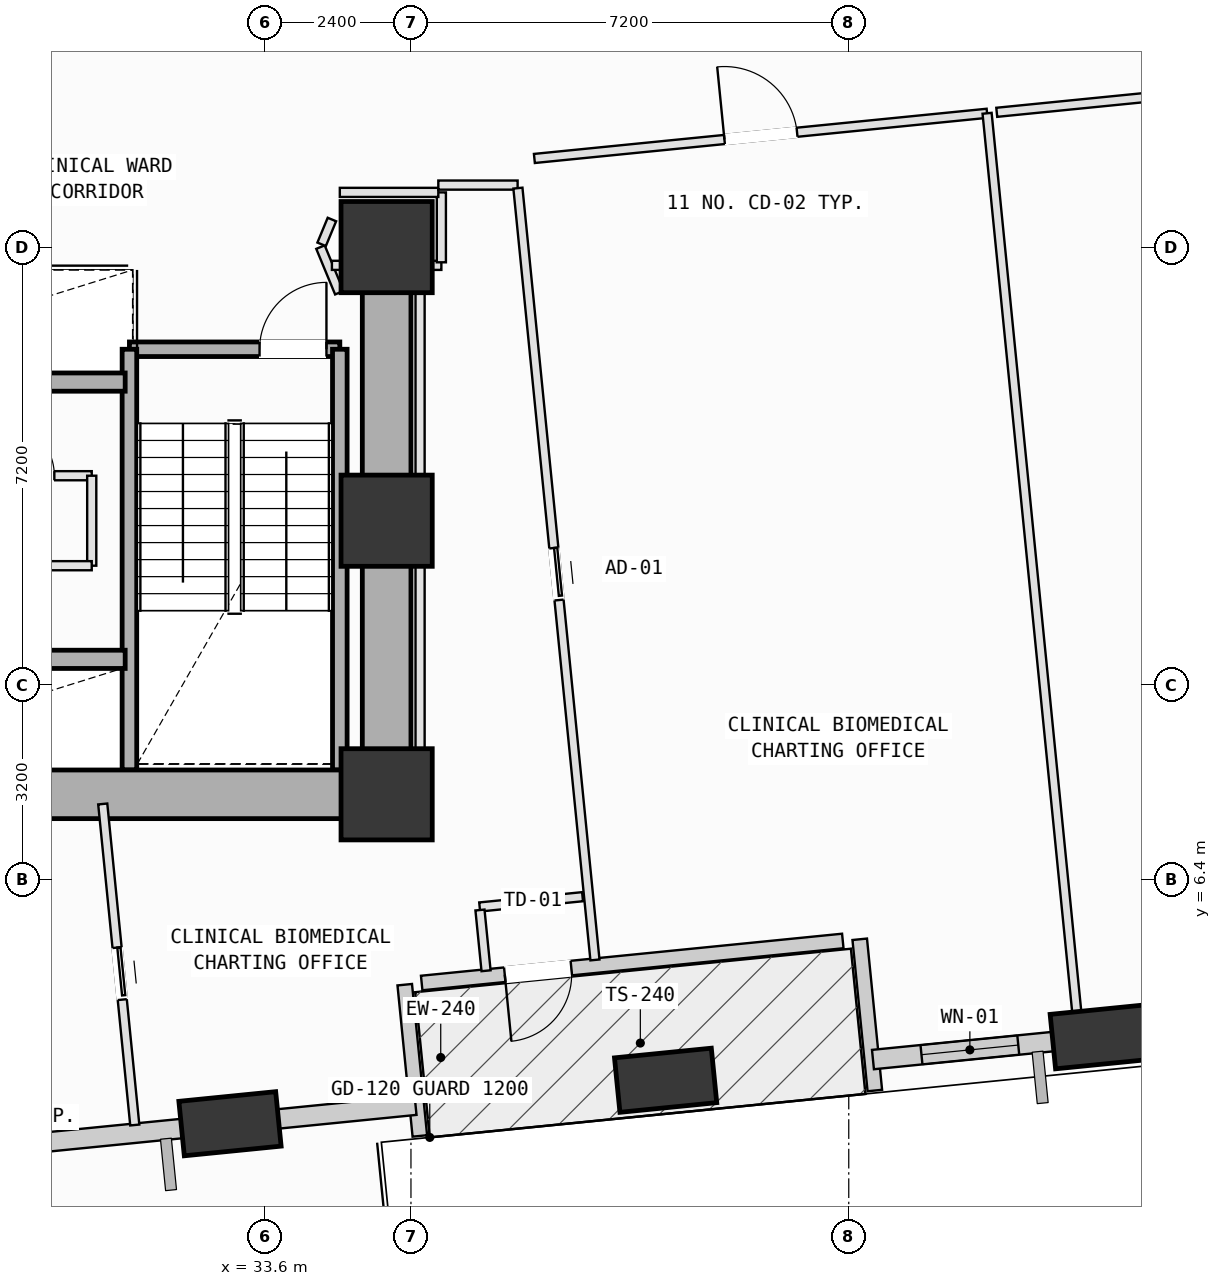
"""IFC4 building model, lengths in metres.
Left out: names, types, materials, properties, quantities, classifications, styles, units other than length and angle.
Written with IfcOpenShell. Run it as: python <this file> out.ifc"""

import sys

from ifc_helpers import new_model, si_unit, direction, frame, frame_2d, origin, origin_2d, place, context, subcontext, project, spatial, rectangle, extrude, element, fill, save


model = new_model("IFC4")
c1 = context("Model", 3, precision=1e-05, world=origin(), true_north=direction((0.0, 1.0)))
c2 = subcontext(c1, "Body", "Model", "MODEL_VIEW")
j1 = project(units=[si_unit("LENGTHUNIT", "METRE"), si_unit("PLANEANGLEUNIT", "RADIAN")], contexts=[c1])
p1 = place(None, origin())
s1 = spatial("IfcSite", under=j1, at=p1, CompositionType="ELEMENT")
p2 = place(p1, origin())
s2 = spatial("IfcBuilding", under=s1, at=p2, CompositionType="ELEMENT")
p3 = place(p2, frame((0.0, 0.0, 47.0)))
s3 = spatial("IfcBuildingStorey", under=s2, at=p3, CompositionType="ELEMENT", Elevation=47.0)
for number, where, z_axis, x_axis in (
    (1, (35.6, 7.8, 0.0), (0.0, 0.0, 1.0), (1.0, 0.0, 0.0)),
    (2, (35.6, 12.3, 0.0), (0.0, 0.0, 1.0), (1.0, 0.0, 0.0)),
    (3, (35.6, 16.8, 0.0), (0.0, 0.0, 1.0), (1.0, 0.0, 0.0)),
):
    element("IfcColumn", number, at=place(p3, frame(where, z_axis=z_axis, x_axis=x_axis)), inside=s3, PredefinedType="COLUMN", context=c2, shape_type="SweptSolid", body=[
        extrude(rectangle(XDim=1.5, YDim=1.5, at=origin_2d()), origin(), (0.0, 0.0, 1.0), 4.0),
    ])
p4 = place(p3, frame((33.024, 2.382, 0.002), z_axis=(0.092515267284, -0.00158145756, 0.995710010149), x_axis=(-0.081872211225, 0.996600464636, 0.009189935574)))
e4 = element("IfcColumn", 4, at=p4, inside=s3, PredefinedType="COLUMN", context=c2, shape_type="SweptSolid", body=[
    extrude(rectangle(XDim=1.6, YDim=0.9, at=origin_2d()), origin(), (0.0, 0.0, 1.0), 4.014),
])
p5 = place(p3, frame((40.188, 3.097, 0.002), z_axis=(0.089343341135, 0.027915992907, 0.995609594537), x_axis=(-0.391147030164, 0.920281246899, 0.00929663378)))
e5 = element("IfcColumn", 5, at=p5, inside=s3, PredefinedType="COLUMN", context=c2, shape_type="SweptSolid", body=[
    extrude(rectangle(XDim=1.6, YDim=0.9, at=origin_2d()), origin(), (0.0, 0.0, 1.0), 4.014),
])
p6 = place(p3, frame((47.353, 3.812, 0.002), z_axis=(0.086035721767, 0.057417907535, 0.994636133706), x_axis=(-0.634531084789, 0.772829064842, 0.010273216236)))
e6 = element("IfcColumn", 6, at=p6, inside=s3, PredefinedType="COLUMN", context=c2, shape_type="SweptSolid", body=[
    extrude(rectangle(XDim=1.6, YDim=0.9, at=origin_2d()), origin(), (0.0, 0.0, 1.0), 4.018),
])
p7 = place(p3, frame((43.102, 5.388, 0.0), z_axis=(0.0, 0.0, 1.0), x_axis=(-0.995056966999, -0.099305752232, 0.0)))
e7 = element("IfcWall", 7, at=p7, inside=s3, PredefinedType="SOLIDWALL", context=c2, shape_type="SweptSolid", body=[
    extrude(rectangle(XDim=6.96, YDim=0.24, at=frame_2d((3.48, 0.0))), origin(), (0.0, 0.0, 1.0), 3.165),
])
p8 = place(p7, frame((4.487, 0.0, 0.0)))
e8 = element("IfcOpeningElement", 8, at=p8, cuts=e7, PredefinedType="OPENING", context=c2, shape_type="SweptSolid", body=[
    extrude(rectangle(XDim=1.1, YDim=2.15, at=frame_2d((0.55, 1.075))), frame((0.0, 0.13, 0.0), z_axis=(0.0, -1.0, 0.0), x_axis=(1.0, 0.0, 0.0)), (0.0, 0.0, 1.0), 0.26),
])
p9 = place(p3, frame((35.898, 4.669, 0.0), z_axis=(0.0, 0.0, 1.0), x_axis=(0.099310350221, -0.995056508113, 0.0)))
e9 = element("IfcWall", 9, at=p9, inside=s3, PredefinedType="SOLIDWALL", context=c2, shape_type="SweptSolid", body=[
    extrude(rectangle(XDim=2.5, YDim=0.24, at=frame_2d((1.25, 0.0))), origin(), (0.0, 0.0, 1.0), 3.165),
])
p10 = place(p3, frame((43.629, 2.928, 0.0), z_axis=(0.0, 0.0, 1.0), x_axis=(-0.099320000899, 0.995055544893, 0.0)))
e10 = element("IfcWall", 10, at=p10, inside=s3, PredefinedType="SOLIDWALL", context=c2, shape_type="SweptSolid", body=[
    extrude(rectangle(XDim=2.5, YDim=0.24, at=frame_2d((1.25, 0.0))), origin(), (0.0, 0.0, 1.0), 3.165),
])
p11 = place(p3, frame((32.603, 2.34, 0.0), z_axis=(0.0, 0.0, 1.0), x_axis=(-0.995058153954, -0.099293858063, 0.0)))
e11 = element("IfcWall", 11, at=p11, inside=s3, PredefinedType="SOLIDWALL", context=c2, shape_type="SweptSolid", body=[
    extrude(rectangle(XDim=5.99, YDim=0.32, at=frame_2d((2.995, 0.0))), origin(), (0.0, 0.0, 1.0), 3.165),
])
p12 = place(p11, frame((2.767, 0.0, 0.75)))
e12 = element("IfcOpeningElement", 12, at=p12, cuts=e11, PredefinedType="OPENING", context=c2, shape_type="SweptSolid", body=[
    extrude(rectangle(XDim=1.8, YDim=2.05, at=frame_2d((0.9, 1.025))), frame((0.0, 0.17, 0.0), z_axis=(0.0, -1.0, 0.0), x_axis=(1.0, 0.0, 0.0)), (0.0, 0.0, 1.0), 0.34),
])
p13 = place(p3, frame((36.075, 2.687, 0.0), z_axis=(0.0, 0.0, 1.0), x_axis=(-0.995059481392, -0.099280554448, 0.0)))
e13 = element("IfcWall", 13, at=p13, inside=s3, PredefinedType="SOLIDWALL", context=c2, shape_type="SweptSolid", body=[
    extrude(rectangle(XDim=2.275, YDim=0.32, at=frame_2d((1.137, 0.0))), origin(), (0.0, 0.0, 1.0), 3.145),
])
p14 = place(p3, frame((46.938, 3.771, 0.0), z_axis=(0.0, 0.0, 1.0), x_axis=(-0.995059489142, -0.099280476769, 0.0)))
e14 = element("IfcWall", 14, at=p14, inside=s3, PredefinedType="SOLIDWALL", context=c2, shape_type="SweptSolid", body=[
    extrude(rectangle(XDim=3.357, YDim=0.32, at=frame_2d((1.678, 0.0))), origin(), (0.0, 0.0, 1.0), 3.145),
])
p15 = place(p14, frame((0.955, 0.0, 0.75)))
e15 = element("IfcOpeningElement", 15, at=p15, cuts=e14, PredefinedType="OPENING", context=c2, shape_type="SweptSolid", body=[
    extrude(rectangle(XDim=1.6, YDim=1.95, at=frame_2d((0.8, 0.975))), frame((0.0, 0.17, 0.0), z_axis=(0.0, -1.0, 0.0), x_axis=(1.0, 0.0, 0.0)), (0.0, 0.0, 1.0), 0.34),
])
p16 = place(p3, frame((31.37, 15.12, 0.0), z_axis=(0.0, 0.0, 1.0), x_axis=(1.0, 0.0, 0.0)))
e16 = element("IfcWall", 16, at=p16, inside=s3, PredefinedType="SOLIDWALL", context=c2, shape_type="SweptSolid", body=[
    extrude(rectangle(XDim=3.46, YDim=0.24, at=frame_2d((1.73, 0.0))), origin(), (0.0, 0.0, 1.0), 3.78),
])
p17 = place(p16, frame((2.14, 0.0, 0.0)))
e17 = element("IfcOpeningElement", 17, at=p17, cuts=e16, PredefinedType="OPENING", context=c2, shape_type="SweptSolid", body=[
    extrude(rectangle(XDim=1.1, YDim=2.15, at=frame_2d((0.55, 1.075))), frame((0.0, 0.13, 0.0), z_axis=(0.0, -1.0, 0.0), x_axis=(1.0, 0.0, 0.0)), (0.0, 0.0, 1.0), 0.26),
])
for number, where, z_axis, x_axis in (
    (18, (34.83, 15.12, 0.0), (0.0, 0.0, 1.0), (0.0, -1.0, 0.0)),
    (19, (31.37, 8.2, 0.0), (0.0, 0.0, 1.0), (0.0, 1.0, 0.0)),
):
    element("IfcWall", number, at=place(p3, frame(where, z_axis=z_axis, x_axis=x_axis)), inside=s3, PredefinedType="SOLIDWALL", context=c2, shape_type="SweptSolid", body=[
        extrude(rectangle(XDim=6.92, YDim=0.24, at=frame_2d((3.46, 0.0))), origin(), (0.0, 0.0, 1.0), 3.78),
    ])
p18 = place(p3, frame((24.8, 7.8, 0.0), z_axis=(0.0, 0.0, 1.0), x_axis=(1.0, 0.0, 0.0)))
e20 = element("IfcWall", 20, at=p18, inside=s3, PredefinedType="SHEAR", context=c2, shape_type="SweptSolid", body=[
    extrude(rectangle(XDim=10.8, YDim=0.8, at=frame_2d((5.4, 0.0))), origin(), (0.0, 0.0, 1.0), 3.78),
])
p19 = place(p3, frame((35.6, 7.8, 0.0), z_axis=(0.0, 0.0, 1.0), x_axis=(0.0, 1.0, 0.0)))
e21 = element("IfcWall", 21, at=p19, inside=s3, PredefinedType="SHEAR", context=c2, shape_type="SweptSolid", body=[
    extrude(rectangle(XDim=9.0, YDim=0.8, at=frame_2d((4.5, 0.0))), origin(), (0.0, 0.0, 1.0), 3.78),
])
p20 = place(p3, frame((25.85, 10.02, 0.0), z_axis=(0.0, 0.0, 1.0), x_axis=(1.0, 0.0, 0.0)))
e22 = element("IfcWall", 22, at=p20, inside=s3, PredefinedType="SOLIDWALL", context=c2, shape_type="SweptSolid", body=[
    extrude(rectangle(XDim=5.45, YDim=0.3, at=frame_2d((2.725, 0.0))), origin(), (0.0, 0.0, 1.0), 3.78),
])
p21 = place(p20, frame((0.34, 0.0, 0.0)))
e23 = element("IfcOpeningElement", 23, at=p21, cuts=e22, PredefinedType="OPENING", context=c2, shape_type="SweptSolid", body=[
    extrude(rectangle(XDim=1.12, YDim=2.15, at=frame_2d((0.56, 1.075))), frame((0.0, 0.16, 0.0), z_axis=(0.0, -1.0, 0.0), x_axis=(1.0, 0.0, 0.0)), (0.0, 0.0, 1.0), 0.32),
])
p22 = place(p20, frame((2.24, 0.0, 0.0)))
e24 = element("IfcOpeningElement", 24, at=p22, cuts=e22, PredefinedType="OPENING", context=c2, shape_type="SweptSolid", body=[
    extrude(rectangle(XDim=1.12, YDim=2.15, at=frame_2d((0.56, 1.075))), frame((0.0, 0.16, 0.0), z_axis=(0.0, -1.0, 0.0), x_axis=(1.0, 0.0, 0.0)), (0.0, 0.0, 1.0), 0.32),
])
p23 = place(p3, frame((25.85, 14.58, 0.0), z_axis=(0.0, 0.0, 1.0), x_axis=(1.0, 0.0, 0.0)))
e25 = element("IfcWall", 25, at=p23, inside=s3, PredefinedType="SOLIDWALL", context=c2, shape_type="SweptSolid", body=[
    extrude(rectangle(XDim=5.45, YDim=0.3, at=frame_2d((2.725, 0.0))), origin(), (0.0, 0.0, 1.0), 3.78),
])
p24 = place(p3, frame((28.6, 13.04, 0.0), z_axis=(0.0, 0.0, 1.0), x_axis=(1.0, 0.0, 0.0)))
e26 = element("IfcWall", 26, at=p24, inside=s3, PredefinedType="PARTITIONING", context=c2, shape_type="SweptSolid", body=[
    extrude(rectangle(XDim=2.15, YDim=0.15, at=frame_2d((1.075, 0.0))), origin(), (0.0, 0.0, 1.0), 3.78),
])
p25 = place(p24, frame((0.615, 0.0, 0.0)))
e27 = element("IfcOpeningElement", 27, at=p25, cuts=e26, PredefinedType="OPENING", context=c2, shape_type="SweptSolid", body=[
    extrude(rectangle(XDim=0.92, YDim=2.1, at=frame_2d((0.46, 1.05))), frame((0.0, 0.085, 0.0), z_axis=(0.0, -1.0, 0.0), x_axis=(1.0, 0.0, 0.0)), (0.0, 0.0, 1.0), 0.17),
])
p26 = place(p3, frame((30.75, 13.04, 0.0), z_axis=(0.0, 0.0, 1.0), x_axis=(0.0, -1.0, 0.0)))
e28 = element("IfcWall", 28, at=p26, inside=s3, PredefinedType="PARTITIONING", context=c2, shape_type="SweptSolid", body=[
    extrude(rectangle(XDim=1.48, YDim=0.15, at=frame_2d((0.74, 0.0))), origin(), (0.0, 0.0, 1.0), 3.78),
])
p27 = place(p3, frame((30.75, 11.56, 0.0), z_axis=(0.0, 0.0, 1.0), x_axis=(-1.0, 0.0, 0.0)))
e29 = element("IfcWall", 29, at=p27, inside=s3, PredefinedType="PARTITIONING", context=c2, shape_type="SweptSolid", body=[
    extrude(rectangle(XDim=2.15, YDim=0.15, at=frame_2d((1.075, 0.0))), origin(), (0.0, 0.0, 1.0), 3.78),
])
p28 = place(p3, frame((30.931, 7.641, 0.0), z_axis=(0.0, 0.0, 1.0), x_axis=(0.099335166826, -0.995054031011, 0.0)))
e30 = element("IfcWall", 30, at=p28, inside=s3, PredefinedType="PARTITIONING", context=c2, shape_type="SweptSolid", body=[
    extrude(rectangle(XDim=5.306, YDim=0.15, at=frame_2d((2.653, 0.0))), origin(), (0.0, 0.0, 1.0), 3.78),
])
p29 = place(p28, frame((2.374, 0.0, 0.0)))
e31 = element("IfcOpeningElement", 31, at=p29, cuts=e30, PredefinedType="OPENING", context=c2, shape_type="SweptSolid", body=[
    extrude(rectangle(XDim=0.86, YDim=2.06, at=frame_2d((0.43, 1.03))), frame((0.0, 0.085, 0.0), z_axis=(0.0, -1.0, 0.0), x_axis=(1.0, 0.0, 0.0)), (0.0, 0.0, 1.0), 0.17),
])
p30 = place(p3, frame((36.15, 7.5, 0.0), z_axis=(0.0, 0.0, 1.0), x_axis=(0.0, 1.0, 0.0)))
e32 = element("IfcWall", 32, at=p30, inside=s3, PredefinedType="PARTITIONING", context=c2, shape_type="SweptSolid", body=[
    extrude(rectangle(XDim=8.84, YDim=0.15, at=frame_2d((4.42, 0.0))), origin(), (0.0, 0.0, 1.0), 3.78),
])
p31 = place(p3, frame((34.822, 16.05, 0.0), z_axis=(0.0, 0.0, 1.0), x_axis=(-0.382050639738, 0.924141389981, 0.0)))
e33 = element("IfcWall", 33, at=p31, inside=s3, PredefinedType="PARTITIONING", context=c2, shape_type="SweptSolid", body=[
    extrude(rectangle(XDim=0.812, YDim=0.15, at=frame_2d((0.406, 0.0))), origin(), (0.0, 0.0, 1.0), 3.78),
])
p32 = place(p3, frame((34.531, 16.846, 0.0), z_axis=(0.0, 0.0, 1.0), x_axis=(0.382612233621, 0.923909020782, 0.0)))
e34 = element("IfcWall", 34, at=p32, inside=s3, PredefinedType="PARTITIONING", context=c2, shape_type="SweptSolid", body=[
    extrude(rectangle(XDim=0.442, YDim=0.15, at=frame_2d((0.221, 0.0))), origin(), (0.0, 0.0, 1.0), 3.78),
])
p33 = place(p3, frame((34.7, 16.5, 0.0), z_axis=(0.0, 0.0, 1.0), x_axis=(1.0, 0.0, 0.0)))
e35 = element("IfcWall", 35, at=p33, inside=s3, PredefinedType="PARTITIONING", context=c2, shape_type="SweptSolid", body=[
    extrude(rectangle(XDim=0.525, YDim=0.15, at=frame_2d((0.263, 0.0))), origin(), (0.0, 0.0, 1.0), 2.865),
])
p34 = place(p3, frame((35.975, 16.5, 0.0), z_axis=(0.0, 0.0, 1.0), x_axis=(1.0, 0.0, 0.0)))
e36 = element("IfcWall", 36, at=p34, inside=s3, PredefinedType="PARTITIONING", context=c2, shape_type="SweptSolid", body=[
    extrude(rectangle(XDim=0.525, YDim=0.15, at=frame_2d((0.262, 0.0))), origin(), (0.0, 0.0, 1.0), 3.78),
])
p35 = place(p3, frame((36.5, 16.55, 0.0), z_axis=(0.0, 0.0, 1.0), x_axis=(0.0, 1.0, 0.0)))
e37 = element("IfcWall", 37, at=p35, inside=s3, PredefinedType="PARTITIONING", context=c2, shape_type="SweptSolid", body=[
    extrude(rectangle(XDim=1.15, YDim=0.15, at=frame_2d((0.575, 0.0))), origin(), (0.0, 0.0, 1.0), 3.78),
])
p36 = place(p3, frame((36.45, 17.7, 0.0), z_axis=(0.0, 0.0, 1.0), x_axis=(-1.0, 0.0, 0.0)))
e38 = element("IfcWall", 38, at=p36, inside=s3, PredefinedType="PARTITIONING", context=c2, shape_type="SweptSolid", body=[
    extrude(rectangle(XDim=1.62, YDim=0.15, at=frame_2d((0.81, 0.0))), origin(), (0.0, 0.0, 1.0), 3.78),
])
p37 = place(p3, frame((36.45, 17.82, 0.0), z_axis=(0.0, 0.0, 1.0), x_axis=(1.0, 0.0, 0.0)))
e39 = element("IfcWall", 39, at=p37, inside=s3, PredefinedType="PARTITIONING", context=c2, shape_type="SweptSolid", body=[
    extrude(rectangle(XDim=1.304, YDim=0.15, at=frame_2d((0.652, 0.0))), origin(), (0.0, 0.0, 1.0), 3.78),
])
p38 = place(p3, frame((37.759, 17.77, 0.0), z_axis=(0.0, 0.0, 1.0), x_axis=(0.099304762274, -0.995057065796, 0.0)))
e40 = element("IfcWall", 40, at=p38, inside=s3, PredefinedType="PARTITIONING", context=c2, shape_type="SweptSolid", body=[
    extrude(rectangle(XDim=12.757, YDim=0.15, at=frame_2d((6.378, 0.0))), origin(), (0.0, 0.0, 1.0), 3.78),
])
p39 = place(p38, frame((5.948, 0.0, 0.0)))
e41 = element("IfcOpeningElement", 41, at=p39, cuts=e40, PredefinedType="OPENING", context=c2, shape_type="SweptSolid", body=[
    extrude(rectangle(XDim=0.86, YDim=2.06, at=frame_2d((0.43, 1.03))), frame((0.0, 0.085, 0.0), z_axis=(0.0, -1.0, 0.0), x_axis=(1.0, 0.0, 0.0)), (0.0, 0.0, 1.0), 0.17),
])
p40 = place(p3, frame((38.822, 6.116, 0.0), z_axis=(0.0, 0.0, 1.0), x_axis=(-0.995052813777, -0.099347359275, 0.0)))
e42 = element("IfcWall", 42, at=p40, inside=s3, PredefinedType="PARTITIONING", context=c2, shape_type="SweptSolid", body=[
    extrude(rectangle(XDim=1.7, YDim=0.15, at=frame_2d((0.85, 0.0))), origin(), (0.0, 0.0, 1.0), 3.78),
])
p41 = place(p3, frame((37.135, 5.897, 0.0), z_axis=(0.0, 0.0, 1.0), x_axis=(0.099696320529, -0.995017911232, 0.0)))
e43 = element("IfcWall", 43, at=p41, inside=s3, PredefinedType="PARTITIONING", context=c2, shape_type="SweptSolid", body=[
    extrude(rectangle(XDim=1.004, YDim=0.15, at=frame_2d((0.502, 0.0))), origin(), (0.0, 0.0, 1.0), 3.78),
])
p42 = place(p3, frame((33.835, 2.232, 0.0), z_axis=(0.0, 0.0, 1.0), x_axis=(-0.99504116837, -0.099463929391, 0.0)))
e44 = element("IfcWall", 44, at=p42, inside=s3, PredefinedType="PARTITIONING", context=c2, shape_type="SweptSolid", body=[
    extrude(rectangle(XDim=1.215, YDim=0.15, at=frame_2d((0.607, 0.0))), origin(), (0.0, 0.0, 1.0), 3.145),
])
p43 = place(p3, frame((38.03, 18.258, 0.0), z_axis=(0.0, 0.0, 1.0), x_axis=(0.995058167689, 0.099293720422, 0.0)))
e45 = element("IfcWall", 45, at=p43, inside=s3, PredefinedType="PARTITIONING", context=c2, shape_type="SweptSolid", body=[
    extrude(rectangle(XDim=7.482, YDim=0.15, at=frame_2d((3.741, 0.0))), origin(), (0.0, 0.0, 1.0), 3.78),
])
p44 = place(p43, frame((3.141, 0.0, 0.0)))
e46 = element("IfcOpeningElement", 46, at=p44, cuts=e45, PredefinedType="OPENING", context=c2, shape_type="SweptSolid", body=[
    extrude(rectangle(XDim=1.2, YDim=2.15, at=frame_2d((0.6, 1.075))), frame((0.0, 0.085, 0.0), z_axis=(0.0, -1.0, 0.0), x_axis=(1.0, 0.0, 0.0)), (0.0, 0.0, 1.0), 0.17),
])
p45 = place(p3, frame((45.475, 19.001, 0.0), z_axis=(0.0, 0.0, 1.0), x_axis=(0.099277568745, -0.995059779282, 0.0)))
e47 = element("IfcWall", 47, at=p45, inside=s3, PredefinedType="PARTITIONING", context=c2, shape_type="SweptSolid", body=[
    extrude(rectangle(XDim=15.178, YDim=0.15, at=frame_2d((7.589, 0.0))), origin(), (0.0, 0.0, 1.0), 3.78),
])
p46 = place(p3, frame((45.634, 19.017, 0.0), z_axis=(0.0, 0.0, 1.0), x_axis=(0.995068149401, 0.099193639146, 0.0)))
e48 = element("IfcWall", 48, at=p46, inside=s3, PredefinedType="PARTITIONING", context=c2, shape_type="SweptSolid", body=[
    extrude(rectangle(XDim=7.64, YDim=0.15, at=frame_2d((3.82, 0.0))), origin(), (0.0, 0.0, 1.0), 3.78),
])
p47 = place(p46, frame((3.22, 0.0, 0.0)))
e49 = element("IfcOpeningElement", 49, at=p47, cuts=e48, PredefinedType="OPENING", context=c2, shape_type="SweptSolid", body=[
    extrude(rectangle(XDim=1.2, YDim=2.15, at=frame_2d((0.6, 1.075))), frame((0.0, 0.085, 0.0), z_axis=(0.0, -1.0, 0.0), x_axis=(1.0, 0.0, 0.0)), (0.0, 0.0, 1.0), 0.17),
])
p48 = place(p3, frame((48.155, 3.661, 0.0), z_axis=(0.0, 0.0, 1.0), x_axis=(-0.99503719021, -0.099503719021, 0.0)))
e50 = element("IfcWall", 50, at=p48, inside=s3, PredefinedType="PARTITIONING", context=c2, shape_type="SweptSolid", body=[
    extrude(rectangle(XDim=0.984, YDim=0.15, at=frame_2d((0.492, 0.0))), origin(), (0.0, 0.0, 1.0), 3.145),
])
p49 = place(p8, origin())
e51 = element("IfcDoor", 51, at=p49, inside=s3, OperationType="SINGLE_SWING_RIGHT", PredefinedType="DOOR", context=c2, shape_type="SweptSolid", body=[
    extrude(rectangle(XDim=1.1, YDim=2.15, at=frame_2d((0.55, 1.075))), frame((0.0, 0.025, 0.0), z_axis=(0.0, -1.0, 0.0), x_axis=(1.0, 0.0, 0.0)), (0.0, 0.0, 1.0), 0.05),
])
fill(e8, e51)
p50 = place(p15, origin())
e52 = element("IfcWindow", 52, at=p50, inside=s3, PartitioningType="SINGLE_PANEL", PredefinedType="WINDOW", context=c2, shape_type="SweptSolid", body=[
    extrude(rectangle(XDim=1.6, YDim=1.95, at=frame_2d((0.8, 0.975))), frame((0.0, 0.03, 0.0), z_axis=(0.0, -1.0, 0.0), x_axis=(1.0, 0.0, 0.0)), (0.0, 0.0, 1.0), 0.06),
])
fill(e15, e52)
p51 = place(p17, origin())
e53 = element("IfcDoor", 53, at=p51, inside=s3, OperationType="SINGLE_SWING_RIGHT", PredefinedType="DOOR", context=c2, shape_type="SweptSolid", body=[
    extrude(rectangle(XDim=1.1, YDim=2.15, at=frame_2d((0.55, 1.075))), frame((0.0, 0.025, 0.0), z_axis=(0.0, -1.0, 0.0), x_axis=(1.0, 0.0, 0.0)), (0.0, 0.0, 1.0), 0.05),
])
fill(e17, e53)
p52 = place(p25, origin())
e54 = element("IfcDoor", 54, at=p52, inside=s3, OperationType="SINGLE_SWING_LEFT", PredefinedType="DOOR", context=c2, shape_type="SweptSolid", body=[
    extrude(rectangle(XDim=0.92, YDim=2.1, at=frame_2d((0.46, 1.05))), frame((0.0, 0.025, 0.0), z_axis=(0.0, -1.0, 0.0), x_axis=(1.0, 0.0, 0.0)), (0.0, 0.0, 1.0), 0.05),
])
fill(e27, e54)
p53 = place(p44, origin())
e55 = element("IfcDoor", 55, at=p53, inside=s3, OperationType="SINGLE_SWING_LEFT", PredefinedType="DOOR", context=c2, shape_type="SweptSolid", body=[
    extrude(rectangle(XDim=1.2, YDim=2.15, at=frame_2d((0.6, 1.075))), frame((0.0, 0.025, 0.0), z_axis=(0.0, -1.0, 0.0), x_axis=(1.0, 0.0, 0.0)), (0.0, 0.0, 1.0), 0.05),
])
fill(e46, e55)
p54 = place(p39, origin())
e56 = element("IfcDoor", 56, at=p54, inside=s3, OperationType="SLIDING_TO_LEFT", PredefinedType="DOOR", context=c2, shape_type="SweptSolid", body=[
    extrude(rectangle(XDim=0.86, YDim=2.06, at=frame_2d((0.43, 1.03))), frame((0.0, 0.025, 0.0), z_axis=(0.0, -1.0, 0.0), x_axis=(1.0, 0.0, 0.0)), (0.0, 0.0, 1.0), 0.05),
])
fill(e41, e56)
p55 = place(p29, origin())
e57 = element("IfcDoor", 57, at=p55, inside=s3, OperationType="SLIDING_TO_LEFT", PredefinedType="DOOR", context=c2, shape_type="SweptSolid", body=[
    extrude(rectangle(XDim=0.86, YDim=2.06, at=frame_2d((0.43, 1.03))), frame((0.0, 0.025, 0.0), z_axis=(0.0, -1.0, 0.0), x_axis=(1.0, 0.0, 0.0)), (0.0, 0.0, 1.0), 0.05),
])
fill(e31, e57)
save(model, sys.argv[1])
